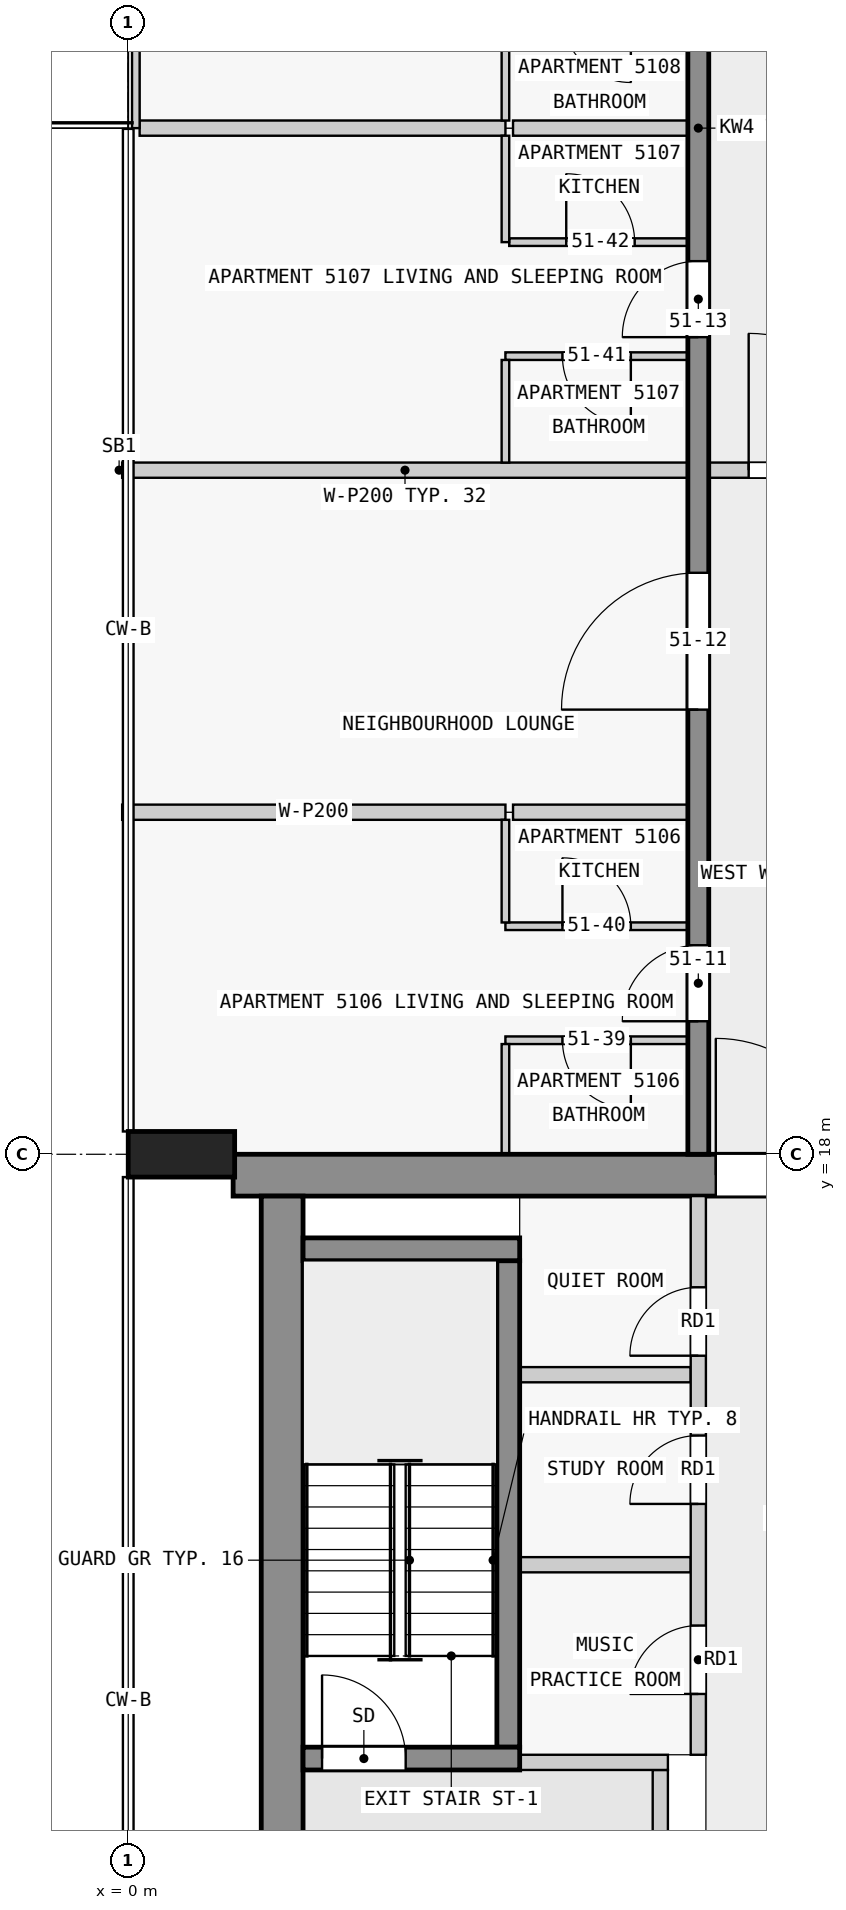
"""IFC4 building model, lengths in metres.
Left out: names, types, materials, properties, quantities, classifications, styles, units other than length and angle.
Written with IfcOpenShell. Run it as: python <this file> out.ifc"""

import sys

from ifc_helpers import new_model, si_unit, direction, frame, frame_2d, origin, origin_2d, place, context, subcontext, project, spatial, rectangle, extrude, element, fill, save


model = new_model("IFC4")
c1 = context("Model", 3, precision=1e-05, world=origin(), true_north=direction((0.0, 1.0)))
c2 = subcontext(c1, "Body", "Model", "MODEL_VIEW")
j1 = project(units=[si_unit("LENGTHUNIT", "METRE"), si_unit("PLANEANGLEUNIT", "RADIAN")], contexts=[c1])
p1 = place(None, origin())
s1 = spatial("IfcSite", under=j1, at=p1, CompositionType="ELEMENT")
p2 = place(p1, origin())
s2 = spatial("IfcBuilding", under=s1, at=p2, CompositionType="ELEMENT")
p3 = place(p2, frame((0.0, 0.0, 197.9)))
s3 = spatial("IfcBuildingStorey", under=s2, at=p3, CompositionType="ELEMENT", Elevation=197.9)
p4 = place(p3, frame((0.7, 18.0, 0.0), z_axis=(0.0, 0.0, 1.0), x_axis=(0.0, 1.0, 0.0)))
e1 = element("IfcColumn", 1, at=p4, inside=s3, PredefinedType="COLUMN", context=c2, shape_type="SweptSolid", body=[
    extrude(rectangle(XDim=0.6, YDim=1.4, at=origin_2d()), origin(), (0.0, 0.0, 1.0), 3.5),
])
p5 = place(p3, frame((1.38, 17.725, 0.0), z_axis=(0.0, 0.0, 1.0), x_axis=(1.0, 0.0, 0.0)))
e2 = element("IfcWall", 2, at=p5, inside=s3, PredefinedType="SHEAR", context=c2, shape_type="SweptSolid", body=[
    extrude(rectangle(XDim=21.12, YDim=0.55, at=frame_2d((10.56, 0.0))), origin(), (0.0, 0.0, 1.0), 3.25),
])
p6 = place(p5, frame((6.35, 0.0, 0.0)))
e3 = element("IfcOpeningElement", 3, at=p6, cuts=e2, PredefinedType="OPENING", context=c2, shape_type="SweptSolid", body=[
    extrude(rectangle(XDim=1.8, YDim=2.1, at=frame_2d((0.9, 1.05))), frame((0.0, 0.285, 0.0), z_axis=(0.0, -1.0, 0.0), x_axis=(1.0, 0.0, 0.0)), (0.0, 0.0, 1.0), 0.57),
])
p7 = place(p3, frame((2.025, 2.5, 0.0), z_axis=(0.0, 0.0, 1.0), x_axis=(0.0, 1.0, 0.0)))
e4 = element("IfcWall", 4, at=p7, inside=s3, PredefinedType="SHEAR", context=c2, shape_type="SweptSolid", body=[
    extrude(rectangle(XDim=14.95, YDim=0.55, at=frame_2d((7.475, 0.0))), origin(), (0.0, 0.0, 1.0), 3.25),
])
p8 = place(p3, frame((2.3, 10.05, 0.0), z_axis=(0.0, 0.0, 1.0), x_axis=(1.0, 0.0, 0.0)))
e5 = element("IfcWall", 5, at=p8, inside=s3, PredefinedType="SHEAR", context=c2, shape_type="SweptSolid", body=[
    extrude(rectangle(XDim=2.85, YDim=0.3, at=frame_2d((1.425, 0.0))), origin(), (0.0, 0.0, 1.0), 3.25),
])
p9 = place(p8, frame((0.25, 0.0, 0.0)))
e6 = element("IfcOpeningElement", 6, at=p9, cuts=e5, PredefinedType="OPENING", context=c2, shape_type="SweptSolid", body=[
    extrude(rectangle(XDim=1.1, YDim=2.1, at=frame_2d((0.55, 1.05))), frame((0.0, 0.16, 0.0), z_axis=(0.0, -1.0, 0.0), x_axis=(1.0, 0.0, 0.0)), (0.0, 0.0, 1.0), 0.32),
])
p10 = place(p3, frame((5.0, 10.2, 0.0), z_axis=(0.0, 0.0, 1.0), x_axis=(0.0, 1.0, 0.0)))
e7 = element("IfcWall", 7, at=p10, inside=s3, PredefinedType="SHEAR", context=c2, shape_type="SweptSolid", body=[
    extrude(rectangle(XDim=6.4, YDim=0.3, at=frame_2d((3.2, 0.0))), origin(), (0.0, 0.0, 1.0), 3.25),
])
p11 = place(p3, frame((2.3, 16.75, 0.0), z_axis=(0.0, 0.0, 1.0), x_axis=(1.0, 0.0, 0.0)))
e8 = element("IfcWall", 8, at=p11, inside=s3, PredefinedType="SHEAR", context=c2, shape_type="SweptSolid", body=[
    extrude(rectangle(XDim=2.85, YDim=0.3, at=frame_2d((1.425, 0.0))), origin(), (0.0, 0.0, 1.0), 3.25),
])
p12 = place(p3, frame((7.5, 18.0, 0.0), z_axis=(0.0, 0.0, 1.0), x_axis=(0.0, 1.0, 0.0)))
e9 = element("IfcWall", 9, at=p12, inside=s3, PredefinedType="SHEAR", context=c2, shape_type="SweptSolid", body=[
    extrude(rectangle(XDim=27.0, YDim=0.275, at=frame_2d((13.5, 0.0))), origin(), (0.0, 0.0, 1.0), 3.25),
])
p13 = place(p12, frame((1.75, 0.0, 0.0)))
e10 = element("IfcOpeningElement", 10, at=p13, cuts=e9, PredefinedType="OPENING", context=c2, shape_type="SweptSolid", body=[
    extrude(rectangle(XDim=1.0, YDim=2.1, at=frame_2d((0.5, 1.05))), frame((0.0, 0.147, 0.0), z_axis=(0.0, -1.0, 0.0), x_axis=(1.0, 0.0, 0.0)), (0.0, 0.0, 1.0), 0.295),
])
p14 = place(p12, frame((5.85, 0.0, 0.0)))
e11 = element("IfcOpeningElement", 11, at=p14, cuts=e9, PredefinedType="OPENING", context=c2, shape_type="SweptSolid", body=[
    extrude(rectangle(XDim=1.8, YDim=2.1, at=frame_2d((0.9, 1.05))), frame((0.0, 0.147, 0.0), z_axis=(0.0, -1.0, 0.0), x_axis=(1.0, 0.0, 0.0)), (0.0, 0.0, 1.0), 0.295),
])
p15 = place(p12, frame((10.75, 0.0, 0.0)))
e12 = element("IfcOpeningElement", 12, at=p15, cuts=e9, PredefinedType="OPENING", context=c2, shape_type="SweptSolid", body=[
    extrude(rectangle(XDim=1.0, YDim=2.1, at=frame_2d((0.5, 1.05))), frame((0.0, 0.147, 0.0), z_axis=(0.0, -1.0, 0.0), x_axis=(1.0, 0.0, 0.0)), (0.0, 0.0, 1.0), 0.295),
])
p16 = place(p12, frame((15.25, 0.0, 0.0)))
e13 = element("IfcOpeningElement", 13, at=p16, cuts=e9, PredefinedType="OPENING", context=c2, shape_type="SweptSolid", body=[
    extrude(rectangle(XDim=1.0, YDim=2.1, at=frame_2d((0.5, 1.05))), frame((0.0, 0.147, 0.0), z_axis=(0.0, -1.0, 0.0), x_axis=(1.0, 0.0, 0.0)), (0.0, 0.0, 1.0), 0.295),
])
p17 = place(p12, frame((21.35, 0.0, 0.0)))
e14 = element("IfcOpeningElement", 14, at=p17, cuts=e9, PredefinedType="OPENING", context=c2, shape_type="SweptSolid", body=[
    extrude(rectangle(XDim=1.0, YDim=2.1, at=frame_2d((0.5, 1.05))), frame((0.0, 0.147, 0.0), z_axis=(0.0, -1.0, 0.0), x_axis=(1.0, 0.0, 0.0)), (0.0, 0.0, 1.0), 0.295),
])
p18 = place(p3, frame((0.1, 31.5, 0.0), z_axis=(0.0, 0.0, 1.0), x_axis=(0.0, 1.0, 0.0)))
e15 = element("IfcWall", 15, at=p18, inside=s3, PredefinedType="STANDARD", context=c2, shape_type="SweptSolid", body=[
    extrude(rectangle(XDim=4.5, YDim=0.1, at=frame_2d((2.25, 0.0))), origin(), (0.0, 0.0, 1.0), 3.25),
])
p19 = place(p18, frame((1.05, 0.0, 0.0)))
e16 = element("IfcOpeningElement", 16, at=p19, cuts=e15, PredefinedType="OPENING", context=c2, shape_type="SweptSolid", body=[
    extrude(rectangle(XDim=2.4, YDim=2.4, at=frame_2d((1.2, 1.2))), frame((0.0, 0.06, 0.0), z_axis=(0.0, -1.0, 0.0), x_axis=(1.0, 0.0, 0.0)), (0.0, 0.0, 1.0), 0.12),
])
p20 = place(p3, frame((7.0, 5.9, 0.0), z_axis=(0.0, 0.0, 1.0), x_axis=(0.0, 1.0, 0.0)))
e17 = element("IfcWall", 17, at=p20, inside=s3, PredefinedType="PARTITIONING", context=c2, shape_type="SweptSolid", body=[
    extrude(rectangle(XDim=4.0, YDim=0.2, at=frame_2d((2.0, 0.0))), origin(), (0.0, 0.0, 1.0), 3.25),
])
p21 = place(p20, frame((0.45, 0.0, 0.0)))
e18 = element("IfcOpeningElement", 18, at=p21, cuts=e17, PredefinedType="OPENING", context=c2, shape_type="SweptSolid", body=[
    extrude(rectangle(XDim=1.1, YDim=2.1, at=frame_2d((0.55, 1.05))), frame((0.0, 0.11, 0.0), z_axis=(0.0, -1.0, 0.0), x_axis=(1.0, 0.0, 0.0)), (0.0, 0.0, 1.0), 0.22),
])
p22 = place(p3, frame((5.15, 10.0, 0.0), z_axis=(0.0, 0.0, 1.0), x_axis=(1.0, 0.0, 0.0)))
e19 = element("IfcWall", 19, at=p22, inside=s3, PredefinedType="PARTITIONING", context=c2, shape_type="SweptSolid", body=[
    extrude(rectangle(XDim=1.95, YDim=0.2, at=frame_2d((0.975, 0.0))), origin(), (0.0, 0.0, 1.0), 3.25),
])
p23 = place(p3, frame((7.5, 10.1, 0.0), z_axis=(0.0, 0.0, 1.0), x_axis=(0.0, 1.0, 0.0)))
e20 = element("IfcWall", 20, at=p23, inside=s3, PredefinedType="PARTITIONING", context=c2, shape_type="SweptSolid", body=[
    extrude(rectangle(XDim=7.35, YDim=0.2, at=frame_2d((3.675, 0.0))), origin(), (0.0, 0.0, 1.0), 3.25),
])
p24 = place(p23, frame((0.8, 0.0, 0.0)))
e21 = element("IfcOpeningElement", 21, at=p24, cuts=e20, PredefinedType="OPENING", context=c2, shape_type="SweptSolid", body=[
    extrude(rectangle(XDim=0.9, YDim=2.1, at=frame_2d((0.45, 1.05))), frame((0.0, 0.11, 0.0), z_axis=(0.0, -1.0, 0.0), x_axis=(1.0, 0.0, 0.0)), (0.0, 0.0, 1.0), 0.22),
])
p25 = place(p23, frame((3.3, 0.0, 0.0)))
e22 = element("IfcOpeningElement", 22, at=p25, cuts=e20, PredefinedType="OPENING", context=c2, shape_type="SweptSolid", body=[
    extrude(rectangle(XDim=0.9, YDim=2.1, at=frame_2d((0.45, 1.05))), frame((0.0, 0.11, 0.0), z_axis=(0.0, -1.0, 0.0), x_axis=(1.0, 0.0, 0.0)), (0.0, 0.0, 1.0), 0.22),
])
p26 = place(p23, frame((5.25, 0.0, 0.0)))
e23 = element("IfcOpeningElement", 23, at=p26, cuts=e20, PredefinedType="OPENING", context=c2, shape_type="SweptSolid", body=[
    extrude(rectangle(XDim=0.9, YDim=2.1, at=frame_2d((0.45, 1.05))), frame((0.0, 0.11, 0.0), z_axis=(0.0, -1.0, 0.0), x_axis=(1.0, 0.0, 0.0)), (0.0, 0.0, 1.0), 0.22),
])
for number, where, z_axis, x_axis in (
    (24, (5.15, 12.6, 0.0), (0.0, 0.0, 1.0), (1.0, 0.0, 0.0)),
    (25, (5.15, 15.1, 0.0), (0.0, 0.0, 1.0), (1.0, 0.0, 0.0)),
):
    element("IfcWall", number, at=place(p3, frame(where, z_axis=z_axis, x_axis=x_axis)), inside=s3, PredefinedType="PARTITIONING", context=c2, shape_type="SweptSolid", body=[
        extrude(rectangle(XDim=2.25, YDim=0.2, at=frame_2d((1.125, 0.0))), origin(), (0.0, 0.0, 1.0), 3.25),
    ])
p27 = place(p3, frame((7.363, 19.5, 0.0), z_axis=(0.0, 0.0, 1.0), x_axis=(-1.0, 0.0, 0.0)))
e26 = element("IfcWall", 26, at=p27, inside=s3, PredefinedType="PARTITIONING", context=c2, shape_type="SweptSolid", body=[
    extrude(rectangle(XDim=2.4, YDim=0.1, at=frame_2d((1.2, 0.0))), origin(), (0.0, 0.0, 1.0), 3.25),
])
p28 = place(p27, frame((0.75, 0.0, 0.0)))
e27 = element("IfcOpeningElement", 27, at=p28, cuts=e26, PredefinedType="OPENING", context=c2, shape_type="SweptSolid", body=[
    extrude(rectangle(XDim=0.9, YDim=2.1, at=frame_2d((0.45, 1.05))), frame((0.0, 0.06, 0.0), z_axis=(0.0, -1.0, 0.0), x_axis=(1.0, 0.0, 0.0)), (0.0, 0.0, 1.0), 0.12),
])
p29 = place(p3, frame((4.962, 21.0, 0.0), z_axis=(0.0, 0.0, 1.0), x_axis=(1.0, 0.0, 0.0)))
e28 = element("IfcWall", 28, at=p29, inside=s3, PredefinedType="PARTITIONING", context=c2, shape_type="SweptSolid", body=[
    extrude(rectangle(XDim=2.4, YDim=0.1, at=frame_2d((1.2, 0.0))), origin(), (0.0, 0.0, 1.0), 3.25),
])
p30 = place(p29, frame((0.75, 0.0, 0.0)))
e29 = element("IfcOpeningElement", 29, at=p30, cuts=e28, PredefinedType="OPENING", context=c2, shape_type="SweptSolid", body=[
    extrude(rectangle(XDim=0.9, YDim=2.1, at=frame_2d((0.45, 1.05))), frame((0.0, 0.06, 0.0), z_axis=(0.0, -1.0, 0.0), x_axis=(1.0, 0.0, 0.0)), (0.0, 0.0, 1.0), 0.12),
])
p31 = place(p3, frame((7.363, 22.5, 0.0), z_axis=(0.0, 0.0, 1.0), x_axis=(-1.0, 0.0, 0.0)))
e30 = element("IfcWall", 30, at=p31, inside=s3, PredefinedType="PARTITIONING", context=c2, shape_type="SweptSolid", body=[
    extrude(rectangle(XDim=2.3, YDim=0.2, at=frame_2d((1.15, 0.0))), origin(), (0.0, 0.0, 1.0), 3.25),
])
p32 = place(p3, frame((-0.08, 22.5, 0.0), z_axis=(0.0, 0.0, 1.0), x_axis=(1.0, 0.0, 0.0)))
e31 = element("IfcWall", 31, at=p32, inside=s3, PredefinedType="PARTITIONING", context=c2, shape_type="SweptSolid", body=[
    extrude(rectangle(XDim=5.042, YDim=0.2, at=frame_2d((2.521, 0.0))), origin(), (0.0, 0.0, 1.0), 3.25),
])
p33 = place(p3, frame((7.363, 27.0, 0.0), z_axis=(0.0, 0.0, 1.0), x_axis=(-1.0, 0.0, 0.0)))
e32 = element("IfcWall", 32, at=p33, inside=s3, PredefinedType="PARTITIONING", context=c2, shape_type="SweptSolid", body=[
    extrude(rectangle(XDim=7.443, YDim=0.2, at=frame_2d((3.721, 0.0))), origin(), (0.0, 0.0, 1.0), 3.25),
])
p34 = place(p3, frame((7.363, 28.5, 0.0), z_axis=(0.0, 0.0, 1.0), x_axis=(-1.0, 0.0, 0.0)))
e33 = element("IfcWall", 33, at=p34, inside=s3, PredefinedType="PARTITIONING", context=c2, shape_type="SweptSolid", body=[
    extrude(rectangle(XDim=2.4, YDim=0.1, at=frame_2d((1.2, 0.0))), origin(), (0.0, 0.0, 1.0), 3.25),
])
p35 = place(p34, frame((0.75, 0.0, 0.0)))
e34 = element("IfcOpeningElement", 34, at=p35, cuts=e33, PredefinedType="OPENING", context=c2, shape_type="SweptSolid", body=[
    extrude(rectangle(XDim=0.9, YDim=2.1, at=frame_2d((0.45, 1.05))), frame((0.0, 0.06, 0.0), z_axis=(0.0, -1.0, 0.0), x_axis=(1.0, 0.0, 0.0)), (0.0, 0.0, 1.0), 0.12),
])
p36 = place(p3, frame((5.012, 30.0, 0.0), z_axis=(0.0, 0.0, 1.0), x_axis=(1.0, 0.0, 0.0)))
e35 = element("IfcWall", 35, at=p36, inside=s3, PredefinedType="PARTITIONING", context=c2, shape_type="SweptSolid", body=[
    extrude(rectangle(XDim=2.35, YDim=0.1, at=frame_2d((1.175, 0.0))), origin(), (0.0, 0.0, 1.0), 3.25),
])
p37 = place(p36, frame((0.75, 0.0, 0.0)))
e36 = element("IfcOpeningElement", 36, at=p37, cuts=e35, PredefinedType="OPENING", context=c2, shape_type="SweptSolid", body=[
    extrude(rectangle(XDim=0.9, YDim=2.1, at=frame_2d((0.45, 1.05))), frame((0.0, 0.06, 0.0), z_axis=(0.0, -1.0, 0.0), x_axis=(1.0, 0.0, 0.0)), (0.0, 0.0, 1.0), 0.12),
])
p38 = place(p3, frame((7.363, 31.5, 0.0), z_axis=(0.0, 0.0, 1.0), x_axis=(-1.0, 0.0, 0.0)))
e37 = element("IfcWall", 37, at=p38, inside=s3, PredefinedType="PARTITIONING", context=c2, shape_type="SweptSolid", body=[
    extrude(rectangle(XDim=2.3, YDim=0.2, at=frame_2d((1.15, 0.0))), origin(), (0.0, 0.0, 1.0), 3.25),
])
p39 = place(p3, frame((0.15, 31.5, 0.0), z_axis=(0.0, 0.0, 1.0), x_axis=(1.0, 0.0, 0.0)))
e38 = element("IfcWall", 38, at=p39, inside=s3, PredefinedType="PARTITIONING", context=c2, shape_type="SweptSolid", body=[
    extrude(rectangle(XDim=4.812, YDim=0.2, at=frame_2d((2.406, 0.0))), origin(), (0.0, 0.0, 1.0), 3.25),
])
p40 = place(p3, frame((4.962, 19.45, 0.0), z_axis=(0.0, 0.0, 1.0), x_axis=(0.0, -1.0, 0.0)))
e39 = element("IfcWall", 39, at=p40, inside=s3, PredefinedType="PARTITIONING", context=c2, shape_type="SweptSolid", body=[
    extrude(rectangle(XDim=1.45, YDim=0.1, at=frame_2d((0.725, 0.0))), origin(), (0.0, 0.0, 1.0), 3.25),
])
for number, where, z_axis, x_axis in (
    (40, (4.962, 22.4, 0.0), (0.0, 0.0, 1.0), (0.0, -1.0, 0.0)),
    (41, (4.962, 28.45, 0.0), (0.0, 0.0, 1.0), (0.0, -1.0, 0.0)),
):
    element("IfcWall", number, at=place(p3, frame(where, z_axis=z_axis, x_axis=x_axis)), inside=s3, PredefinedType="PARTITIONING", context=c2, shape_type="SweptSolid", body=[
        extrude(rectangle(XDim=1.35, YDim=0.1, at=frame_2d((0.675, 0.0))), origin(), (0.0, 0.0, 1.0), 3.25),
    ])
for number, where, z_axis, x_axis in (
    (42, (4.962, 31.4, 0.0), (0.0, 0.0, 1.0), (0.0, -1.0, 0.0)),
    (43, (4.962, 33.0, 0.0), (0.0, 0.0, 1.0), (0.0, -1.0, 0.0)),
):
    element("IfcWall", number, at=place(p3, frame(where, z_axis=z_axis, x_axis=x_axis)), inside=s3, PredefinedType="PARTITIONING", context=c2, shape_type="SweptSolid", body=[
        extrude(rectangle(XDim=1.4, YDim=0.1, at=frame_2d((0.7, 0.0))), origin(), (0.0, 0.0, 1.0), 3.25),
    ])
p41 = place(p3, frame((7.462, 27.0, 0.0), z_axis=(0.0, 0.0, 1.0), x_axis=(1.0, 0.0, 0.0)))
e44 = element("IfcWall", 44, at=p41, inside=s3, PredefinedType="PARTITIONING", context=c2, shape_type="SweptSolid", body=[
    extrude(rectangle(XDim=3.175, YDim=0.2, at=frame_2d((1.587, 0.0))), origin(), (0.0, 0.0, 1.0), 3.25),
])
p42 = place(p41, frame((0.7, 0.0, 0.0)))
e45 = element("IfcOpeningElement", 45, at=p42, cuts=e44, PredefinedType="OPENING", context=c2, shape_type="SweptSolid", body=[
    extrude(rectangle(XDim=1.8, YDim=2.1, at=frame_2d((0.9, 1.05))), frame((0.0, 0.11, 0.0), z_axis=(0.0, -1.0, 0.0), x_axis=(1.0, 0.0, 0.0)), (0.0, 0.0, 1.0), 0.22),
])
p43 = place(p9, origin())
e46 = element("IfcDoor", 46, at=p43, inside=s3, OperationType="SINGLE_SWING_RIGHT", PredefinedType="DOOR", context=c2, shape_type="SweptSolid", body=[
    extrude(rectangle(XDim=1.1, YDim=2.1, at=frame_2d((0.55, 1.05))), frame((0.0, 0.025, 0.0), z_axis=(0.0, -1.0, 0.0), x_axis=(1.0, 0.0, 0.0)), (0.0, 0.0, 1.0), 0.05),
])
fill(e6, e46)
p44 = place(p6, origin())
e47 = element("IfcDoor", 47, at=p44, inside=s3, OperationType="DOUBLE_DOOR_SINGLE_SWING", PredefinedType="DOOR", context=c2, shape_type="SweptSolid", body=[
    extrude(rectangle(XDim=1.8, YDim=2.1, at=frame_2d((0.9, 1.05))), frame((0.0, 0.025, 0.0), z_axis=(0.0, -1.0, 0.0), x_axis=(1.0, 0.0, 0.0)), (0.0, 0.0, 1.0), 0.05),
])
fill(e3, e47)
p45 = place(p24, origin())
e48 = element("IfcDoor", 48, at=p45, inside=s3, OperationType="SINGLE_SWING_RIGHT", PredefinedType="DOOR", context=c2, shape_type="SweptSolid", body=[
    extrude(rectangle(XDim=0.9, YDim=2.1, at=frame_2d((0.45, 1.05))), frame((0.0, 0.025, 0.0), z_axis=(0.0, -1.0, 0.0), x_axis=(1.0, 0.0, 0.0)), (0.0, 0.0, 1.0), 0.05),
])
fill(e21, e48)
p46 = place(p25, origin())
e49 = element("IfcDoor", 49, at=p46, inside=s3, OperationType="SINGLE_SWING_RIGHT", PredefinedType="DOOR", context=c2, shape_type="SweptSolid", body=[
    extrude(rectangle(XDim=0.9, YDim=2.1, at=frame_2d((0.45, 1.05))), frame((0.0, 0.025, 0.0), z_axis=(0.0, -1.0, 0.0), x_axis=(1.0, 0.0, 0.0)), (0.0, 0.0, 1.0), 0.05),
])
fill(e22, e49)
p47 = place(p26, origin())
e50 = element("IfcDoor", 50, at=p47, inside=s3, OperationType="SINGLE_SWING_RIGHT", PredefinedType="DOOR", context=c2, shape_type="SweptSolid", body=[
    extrude(rectangle(XDim=0.9, YDim=2.1, at=frame_2d((0.45, 1.05))), frame((0.0, 0.025, 0.0), z_axis=(0.0, -1.0, 0.0), x_axis=(1.0, 0.0, 0.0)), (0.0, 0.0, 1.0), 0.05),
])
fill(e23, e50)
p48 = place(p13, origin())
e51 = element("IfcDoor", 51, at=p48, inside=s3, OperationType="SINGLE_SWING_LEFT", PredefinedType="DOOR", context=c2, shape_type="SweptSolid", body=[
    extrude(rectangle(XDim=1.0, YDim=2.1, at=frame_2d((0.5, 1.05))), frame((0.0, 0.025, 0.0), z_axis=(0.0, -1.0, 0.0), x_axis=(1.0, 0.0, 0.0)), (0.0, 0.0, 1.0), 0.05),
])
fill(e10, e51)
p49 = place(p14, origin())
e52 = element("IfcDoor", 52, at=p49, inside=s3, OperationType="SINGLE_SWING_LEFT", PredefinedType="DOOR", context=c2, shape_type="SweptSolid", body=[
    extrude(rectangle(XDim=1.8, YDim=2.1, at=frame_2d((0.9, 1.05))), frame((0.0, 0.025, 0.0), z_axis=(0.0, -1.0, 0.0), x_axis=(1.0, 0.0, 0.0)), (0.0, 0.0, 1.0), 0.05),
])
fill(e11, e52)
p50 = place(p15, origin())
e53 = element("IfcDoor", 53, at=p50, inside=s3, OperationType="SINGLE_SWING_LEFT", PredefinedType="DOOR", context=c2, shape_type="SweptSolid", body=[
    extrude(rectangle(XDim=1.0, YDim=2.1, at=frame_2d((0.5, 1.05))), frame((0.0, 0.025, 0.0), z_axis=(0.0, -1.0, 0.0), x_axis=(1.0, 0.0, 0.0)), (0.0, 0.0, 1.0), 0.05),
])
fill(e12, e53)
p51 = place(p42, origin())
e54 = element("IfcDoor", 54, at=p51, inside=s3, OperationType="SINGLE_SWING_RIGHT", PredefinedType="DOOR", context=c2, shape_type="SweptSolid", body=[
    extrude(rectangle(XDim=1.8, YDim=2.1, at=frame_2d((0.9, 1.05))), frame((0.0, 0.025, 0.0), z_axis=(0.0, -1.0, 0.0), x_axis=(1.0, 0.0, 0.0)), (0.0, 0.0, 1.0), 0.05),
])
fill(e45, e54)
p52 = place(p28, origin())
e55 = element("IfcDoor", 55, at=p52, inside=s3, OperationType="SINGLE_SWING_RIGHT", PredefinedType="DOOR", context=c2, shape_type="SweptSolid", body=[
    extrude(rectangle(XDim=0.9, YDim=2.1, at=frame_2d((0.45, 1.05))), frame((0.0, 0.025, 0.0), z_axis=(0.0, -1.0, 0.0), x_axis=(1.0, 0.0, 0.0)), (0.0, 0.0, 1.0), 0.05),
])
fill(e27, e55)
p53 = place(p30, origin())
e56 = element("IfcDoor", 56, at=p53, inside=s3, OperationType="SINGLE_SWING_RIGHT", PredefinedType="DOOR", context=c2, shape_type="SweptSolid", body=[
    extrude(rectangle(XDim=0.9, YDim=2.1, at=frame_2d((0.45, 1.05))), frame((0.0, 0.025, 0.0), z_axis=(0.0, -1.0, 0.0), x_axis=(1.0, 0.0, 0.0)), (0.0, 0.0, 1.0), 0.05),
])
fill(e29, e56)
p54 = place(p35, origin())
e57 = element("IfcDoor", 57, at=p54, inside=s3, OperationType="SINGLE_SWING_RIGHT", PredefinedType="DOOR", context=c2, shape_type="SweptSolid", body=[
    extrude(rectangle(XDim=0.9, YDim=2.1, at=frame_2d((0.45, 1.05))), frame((0.0, 0.025, 0.0), z_axis=(0.0, -1.0, 0.0), x_axis=(1.0, 0.0, 0.0)), (0.0, 0.0, 1.0), 0.05),
])
fill(e34, e57)
p55 = place(p37, origin())
e58 = element("IfcDoor", 58, at=p55, inside=s3, OperationType="SINGLE_SWING_RIGHT", PredefinedType="DOOR", context=c2, shape_type="SweptSolid", body=[
    extrude(rectangle(XDim=0.9, YDim=2.1, at=frame_2d((0.45, 1.05))), frame((0.0, 0.025, 0.0), z_axis=(0.0, -1.0, 0.0), x_axis=(1.0, 0.0, 0.0)), (0.0, 0.0, 1.0), 0.05),
])
fill(e36, e58)
save(model, sys.argv[1])
